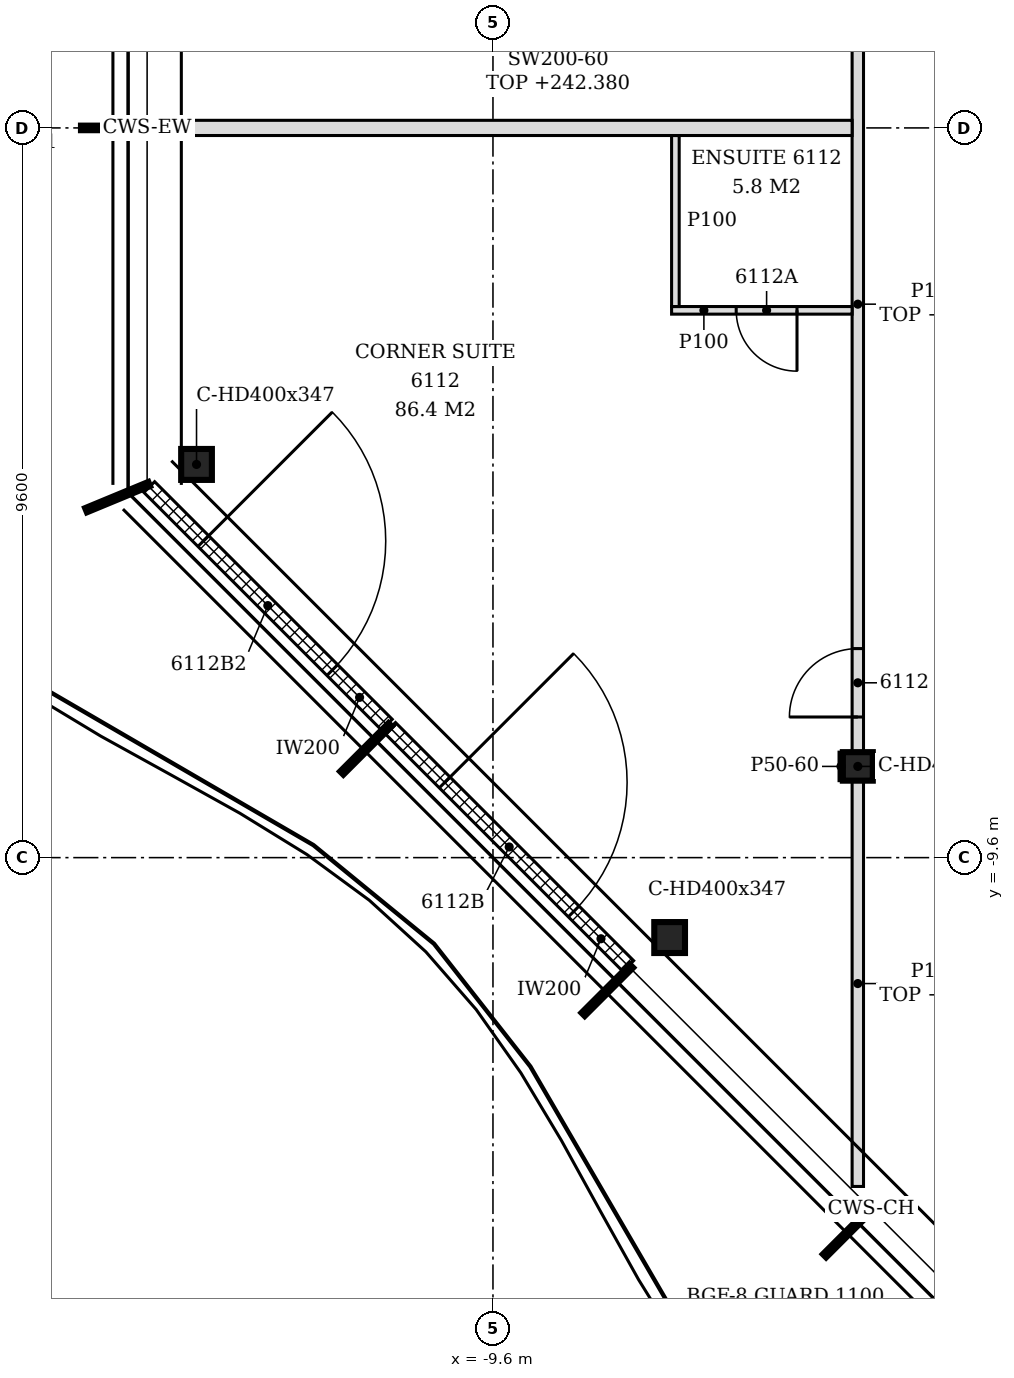
"""IFC4 building model, lengths in metres.
Left out: names, types, materials, properties, quantities, classifications, styles, units other than length and angle.
Written with IfcOpenShell. Run it as: python <this file> out.ifc"""

import sys

from ifc_helpers import new_model, si_unit, direction, frame, frame_2d, origin, origin_2d, place, context, subcontext, project, spatial, polyline, rectangle, i_section, outline, extrude, element, fill, save


model = new_model("IFC4")
c1 = context("Model", 3, precision=1e-05, world=origin(), true_north=direction((0.0, 1.0)))
c2 = subcontext(c1, "Body", "Model", "MODEL_VIEW")
j1 = project(units=[si_unit("LENGTHUNIT", "METRE"), si_unit("PLANEANGLEUNIT", "RADIAN")], contexts=[c1])
p1 = place(None, origin())
s1 = spatial("IfcSite", under=j1, at=p1, CompositionType="ELEMENT")
p2 = place(p1, origin())
s2 = spatial("IfcBuilding", under=s1, at=p2, CompositionType="ELEMENT")
p3 = place(p2, frame((0.0, 0.0, 239.4)))
s3 = spatial("IfcBuildingStorey", under=s2, at=p3, CompositionType="ELEMENT", Elevation=239.4)
for number, where, z_axis, x_axis in (
    (1, (-13.5, -4.427, -0.15), (0.0, 0.0, 1.0), (1.0, 0.0, 0.0)),
    (2, (-7.276, -10.652, -0.15), (0.0, 0.0, 1.0), (1.0, 0.0, 0.0)),
):
    element("IfcColumn", number, at=place(p3, frame(where, z_axis=z_axis, x_axis=x_axis)), inside=s3, PredefinedType="COLUMN", context=c2, shape_type="SweptSolid", body=[
        extrude(i_section(OverallWidth=0.404, OverallDepth=0.407, WebThickness=0.027, FlangeThickness=0.044, FilletRadius=0.015, at=origin_2d()), origin(), (0.0, 0.0, 1.0), 3.6),
    ])
p4 = place(p3, frame((-4.8, -8.4, -0.15), z_axis=(0.0, 0.0, 1.0), x_axis=(1.0, 0.0, 0.0)))
e3 = element("IfcColumn", 3, at=p4, inside=s3, PredefinedType="COLUMN", context=c2, shape_type="SweptSolid", body=[
    extrude(i_section(OverallWidth=0.394, OverallDepth=0.375, WebThickness=0.017, FlangeThickness=0.028, FilletRadius=0.015, at=origin_2d()), origin(), (0.0, 0.0, 1.0), 3.6),
])
p5 = place(p3, frame((-14.122, -4.725, 0.0), z_axis=(0.0, 0.0, 1.0), x_axis=(0.707106781187, -0.707106781187, 0.0)))
e4 = element("IfcWall", 4, at=p5, inside=s3, PredefinedType="NOTDEFINED", context=c2, shape_type="SweptSolid", body=[
    extrude(rectangle(XDim=4.421, YDim=0.2, at=frame_2d((2.21, 0.0))), origin(), (0.0, 0.0, 1.0), 3.45),
])
p6 = place(p5, frame((1.005, 0.0, 0.0)))
e5 = element("IfcOpeningElement", 5, at=p6, cuts=e4, PredefinedType="OPENING", context=c2, shape_type="SweptSolid", body=[
    extrude(rectangle(XDim=2.4, YDim=2.4, at=frame_2d((1.2, 1.2))), frame((0.0, 0.11, 0.0), z_axis=(0.0, -1.0, 0.0), x_axis=(1.0, 0.0, 0.0)), (0.0, 0.0, 1.0), 0.22),
])
p7 = place(p3, frame((-10.953, -7.893, 0.0), z_axis=(0.0, 0.0, 1.0), x_axis=(0.707106781187, -0.707106781187, 0.0)))
e6 = element("IfcWall", 6, at=p7, inside=s3, PredefinedType="NOTDEFINED", context=c2, shape_type="SweptSolid", body=[
    extrude(rectangle(XDim=4.431, YDim=0.2, at=frame_2d((2.215, 0.0))), origin(), (0.0, 0.0, 1.0), 3.45),
])
p8 = place(p7, frame((1.015, 0.0, 0.0)))
e7 = element("IfcOpeningElement", 7, at=p8, cuts=e6, PredefinedType="OPENING", context=c2, shape_type="SweptSolid", body=[
    extrude(rectangle(XDim=2.4, YDim=2.4, at=frame_2d((1.2, 1.2))), frame((0.0, 0.11, 0.0), z_axis=(0.0, -1.0, 0.0), x_axis=(1.0, 0.0, 0.0)), (0.0, 0.0, 1.0), 0.22),
])
p9 = place(p3, frame((-4.8, -13.926, 0.0), z_axis=(0.0, 0.0, 1.0), x_axis=(0.0, 1.0, 0.0)))
e8 = element("IfcWall", 8, at=p9, inside=s3, PredefinedType="PARTITIONING", context=c2, shape_type="SweptSolid", body=[
    extrude(outline(polyline([(0.0, 0.0), (5.339, 0.0), (5.339, 3.03), (1.369, 3.03), (1.367, 2.63), (0.229, 2.63), (0.227, 3.03), (0.0, 3.03), (0.0, 0.0)])), frame((0.0, 0.075, 0.0), z_axis=(0.0, -1.0, 0.0), x_axis=(1.0, 0.0, 0.0)), (0.0, 0.0, 1.0), 0.15),
])
p10 = place(p3, frame((-4.8, -8.212, 0.0), z_axis=(0.0, 0.0, 1.0), x_axis=(0.0, 1.0, 0.0)))
e9 = element("IfcWall", 9, at=p10, inside=s3, PredefinedType="PARTITIONING", context=c2, shape_type="SweptSolid", body=[
    extrude(rectangle(XDim=10.425, YDim=0.15, at=frame_2d((5.212, 0.0))), origin(), (0.0, 0.0, 1.0), 2.83),
])
p11 = place(p10, frame((0.462, 0.0, 0.0)))
e10 = element("IfcOpeningElement", 10, at=p11, cuts=e9, PredefinedType="OPENING", context=c2, shape_type="SweptSolid", body=[
    extrude(rectangle(XDim=0.9, YDim=2.1, at=frame_2d((0.45, 1.05))), frame((0.0, 0.085, 0.0), z_axis=(0.0, -1.0, 0.0), x_axis=(1.0, 0.0, 0.0)), (0.0, 0.0, 1.0), 0.17),
])
p12 = place(p3, frame((-7.25, -2.4, 0.0), z_axis=(0.0, 0.0, 1.0), x_axis=(1.0, 0.0, 0.0)))
e11 = element("IfcWall", 11, at=p12, inside=s3, PredefinedType="PARTITIONING", context=c2, shape_type="SweptSolid", body=[
    extrude(outline(polyline([(0.0, 0.0), (2.375, 0.0), (2.375, 2.83), (2.3, 2.83), (2.298, 3.45), (0.0, 3.45), (0.0, 0.0)])), frame((0.0, 0.05, 0.0), z_axis=(0.0, -1.0, 0.0), x_axis=(1.0, 0.0, 0.0)), (0.0, 0.0, 1.0), 0.1),
])
p13 = place(p12, frame((0.85, 0.0, 0.0)))
e12 = element("IfcOpeningElement", 12, at=p13, cuts=e11, PredefinedType="OPENING", context=c2, shape_type="SweptSolid", body=[
    extrude(rectangle(XDim=0.8, YDim=2.1, at=frame_2d((0.4, 1.05))), frame((0.0, 0.06, 0.0), z_axis=(0.0, -1.0, 0.0), x_axis=(1.0, 0.0, 0.0)), (0.0, 0.0, 1.0), 0.12),
])
p14 = place(p3, frame((-7.2, -2.35, 0.0), z_axis=(0.0, 0.0, 1.0), x_axis=(0.0, 1.0, 0.0)))
e13 = element("IfcWall", 13, at=p14, inside=s3, PredefinedType="PARTITIONING", context=c2, shape_type="SweptSolid", body=[
    extrude(rectangle(XDim=2.25, YDim=0.1, at=frame_2d((1.125, 0.0))), origin(), (0.0, 0.0, 1.0), 3.45),
])
p15 = place(p3, frame((-14.09, 0.0, 0.0), z_axis=(0.0, 0.0, 1.0), x_axis=(1.0, 0.0, 0.0)))
e14 = element("IfcWall", 14, at=p15, inside=s3, PredefinedType="PARTITIONING", context=c2, shape_type="SweptSolid", body=[
    extrude(outline(polyline([(0.0, 0.0), (9.215, 0.0), (9.215, 2.83), (9.14, 2.83), (9.138, 2.98), (0.74, 2.98), (0.738, 2.93), (0.44, 2.93), (0.438, 2.98), (0.0, 2.98), (0.0, 0.0)])), frame((0.0, 0.1, 0.0), z_axis=(0.0, -1.0, 0.0), x_axis=(1.0, 0.0, 0.0)), (0.0, 0.0, 1.0), 0.2),
])
p16 = place(p3, frame((-5.022, -8.587, 0.0), z_axis=(0.0, 0.0, 1.0), x_axis=(0.0, 1.0, 0.0)))
e15 = element("IfcWall", 15, at=p16, inside=s3, PredefinedType="PARTITIONING", context=c2, shape_type="SweptSolid", body=[
    extrude(rectangle(XDim=0.375, YDim=0.05, at=frame_2d((0.188, 0.0))), origin(), (0.0, 0.0, 1.0), 3.45),
])
p17 = place(p6, origin())
e16 = element("IfcDoor", 16, at=p17, inside=s3, OperationType="SINGLE_SWING_LEFT", PredefinedType="DOOR", context=c2, shape_type="SweptSolid", body=[
    extrude(rectangle(XDim=2.4, YDim=2.4, at=frame_2d((1.2, 1.2))), frame((0.0, 0.025, 0.0), z_axis=(0.0, -1.0, 0.0), x_axis=(1.0, 0.0, 0.0)), (0.0, 0.0, 1.0), 0.05),
])
fill(e5, e16)
p18 = place(p8, origin())
e17 = element("IfcDoor", 17, at=p18, inside=s3, OperationType="SINGLE_SWING_LEFT", PredefinedType="DOOR", context=c2, shape_type="SweptSolid", body=[
    extrude(rectangle(XDim=2.4, YDim=2.4, at=frame_2d((1.2, 1.2))), frame((0.0, 0.025, 0.0), z_axis=(0.0, -1.0, 0.0), x_axis=(1.0, 0.0, 0.0)), (0.0, 0.0, 1.0), 0.05),
])
fill(e7, e17)
p19 = place(p11, origin())
e18 = element("IfcDoor", 18, at=p19, inside=s3, OperationType="SINGLE_SWING_LEFT", PredefinedType="DOOR", context=c2, shape_type="SweptSolid", body=[
    extrude(rectangle(XDim=0.9, YDim=2.1, at=frame_2d((0.45, 1.05))), frame((0.0, 0.025, 0.0), z_axis=(0.0, -1.0, 0.0), x_axis=(1.0, 0.0, 0.0)), (0.0, 0.0, 1.0), 0.05),
])
fill(e10, e18)
p20 = place(p13, frame((0.8, 0.0, 0.0), z_axis=(0.0, 0.0, 1.0), x_axis=(-1.0, 0.0, 0.0)))
e19 = element("IfcDoor", 19, at=p20, inside=s3, OperationType="SINGLE_SWING_LEFT", PredefinedType="DOOR", context=c2, shape_type="SweptSolid", body=[
    extrude(rectangle(XDim=0.8, YDim=2.1, at=frame_2d((0.4, 1.05))), frame((0.0, 0.025, 0.0), z_axis=(0.0, -1.0, 0.0), x_axis=(1.0, 0.0, 0.0)), (0.0, 0.0, 1.0), 0.05),
])
fill(e12, e19)
save(model, sys.argv[1])
